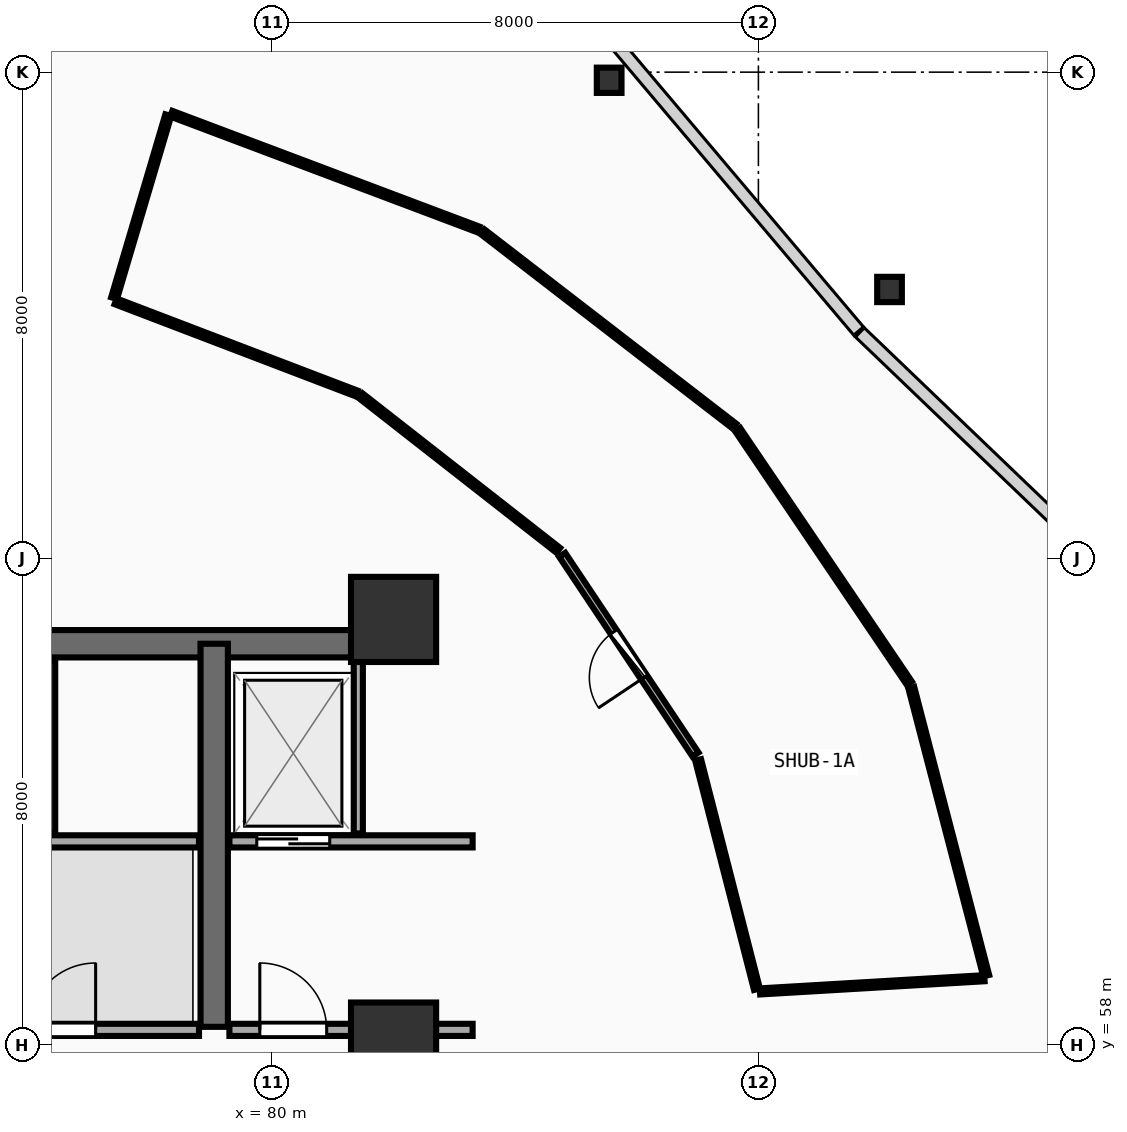
"""IFC4 building model, lengths in metres.
Left out: names, types, materials, properties, quantities, classifications, styles, units other than length and angle.
Written with IfcOpenShell. Run it as: python <this file> out.ifc"""

import sys

from ifc_helpers import new_model, si_unit, direction, frame, frame_2d, origin, origin_2d, place, context, subcontext, project, spatial, rectangle, i_section, extrude, element, fill, save


model = new_model("IFC4")
c1 = context("Model", 3, precision=1e-05, world=origin(), true_north=direction((0.0, 1.0)))
c2 = subcontext(c1, "Body", "Model", "MODEL_VIEW")
j1 = project(units=[si_unit("LENGTHUNIT", "METRE"), si_unit("PLANEANGLEUNIT", "RADIAN")], contexts=[c1])
p1 = place(None, origin())
s1 = spatial("IfcSite", under=j1, at=p1, CompositionType="ELEMENT")
p2 = place(p1, origin())
s2 = spatial("IfcBuilding", under=s1, at=p2, CompositionType="ELEMENT")
p3 = place(p2, frame((0.0, 0.0, 4.5)))
s3 = spatial("IfcBuildingStorey", under=s2, at=p3, CompositionType="ELEMENT", Elevation=4.5)
for number, where, z_axis, x_axis in (
    (1, (82.0, 58.0, 0.0), (0.0, 0.0, 1.0), (1.0, 0.0, 0.0)),
    (2, (82.0, 65.0, 0.0), (0.0, 0.0, 1.0), (1.0, 0.0, 0.0)),
):
    element("IfcColumn", number, at=place(p3, frame(where, z_axis=z_axis, x_axis=x_axis)), inside=s3, PredefinedType="PILASTER", context=c2, shape_type="SweptSolid", body=[
        extrude(rectangle(XDim=1.4, YDim=1.4, at=origin_2d()), origin(), (0.0, 0.0, 1.0), 4.5),
    ])
for number, where, z_axis, x_axis in (
    (3, (90.156, 70.426, 0.0), (0.0, 0.0, 1.0), (1.0, 0.0, 0.0)),
    (4, (85.546, 73.866, 0.0), (0.0, 0.0, 1.0), (1.0, 0.0, 0.0)),
):
    element("IfcColumn", number, at=place(p3, frame(where, z_axis=z_axis, x_axis=x_axis)), inside=s3, PredefinedType="COLUMN", context=c2, shape_type="SweptSolid", body=[
        extrude(i_section(OverallWidth=0.406, OverallDepth=0.416, WebThickness=0.029, FlangeThickness=0.048, FilletRadius=0.015, at=origin_2d()), origin(), (0.0, 0.0, 1.0), 4.5),
    ])
p4 = place(p3, frame((74.0, 64.6, 0.0), z_axis=(0.0, 0.0, 1.0), x_axis=(1.0, 0.0, 0.0)))
e5 = element("IfcWall", 5, at=p4, inside=s3, PredefinedType="SHEAR", context=c2, shape_type="SweptSolid", body=[
    extrude(rectangle(XDim=8.0, YDim=0.45, at=frame_2d((4.0, 0.0))), origin(), (0.0, 0.0, 1.0), 4.2),
])
p5 = place(p3, frame((79.05, 58.3, 0.0), z_axis=(0.0, 0.0, 1.0), x_axis=(0.0, 1.0, 0.0)))
e6 = element("IfcWall", 6, at=p5, inside=s3, PredefinedType="SHEAR", context=c2, shape_type="SweptSolid", body=[
    extrude(rectangle(XDim=6.3, YDim=0.45, at=frame_2d((3.15, 0.0))), origin(), (0.0, 0.0, 1.0), 4.2),
])
p6 = place(p3, frame((74.2, 61.35, 0.0), z_axis=(0.0, 0.0, 1.0), x_axis=(1.0, 0.0, 0.0)))
e7 = element("IfcWall", 7, at=p6, inside=s3, PredefinedType="SOLIDWALL", context=c2, shape_type="SweptSolid", body=[
    extrude(rectangle(XDim=4.6, YDim=0.2, at=frame_2d((2.3, 0.0))), origin(), (0.0, 0.0, 1.0), 4.19),
])
p7 = place(p6, frame((0.52, 0.0, 0.0)))
e8 = element("IfcOpeningElement", 8, at=p7, cuts=e7, PredefinedType="OPENING", context=c2, shape_type="SweptSolid", body=[
    extrude(rectangle(XDim=1.2, YDim=2.15, at=frame_2d((0.6, 1.075))), frame((0.0, 0.11, 0.0), z_axis=(0.0, -1.0, 0.0), x_axis=(1.0, 0.0, 0.0)), (0.0, 0.0, 1.0), 0.22),
])
p8 = place(p3, frame((76.36, 61.48, 0.0), z_axis=(0.0, 0.0, 1.0), x_axis=(0.0, 1.0, 0.0)))
e9 = element("IfcWall", 9, at=p8, inside=s3, PredefinedType="PARTITIONING", context=c2, shape_type="SweptSolid", body=[
    extrude(rectangle(XDim=2.84, YDim=0.15, at=frame_2d((1.42, 0.0))), origin(), (0.0, 0.0, 1.0), 4.19),
])
p9 = place(p3, frame((79.3, 61.35, 0.0), z_axis=(0.0, 0.0, 1.0), x_axis=(1.0, 0.0, 0.0)))
e10 = element("IfcWall", 10, at=p9, inside=s3, PredefinedType="SOLIDWALL", context=c2, shape_type="SweptSolid", body=[
    extrude(rectangle(XDim=4.0, YDim=0.2, at=frame_2d((2.0, 0.0))), origin(), (0.0, 0.0, 1.0), 3.485),
])
p10 = place(p9, frame((0.45, 0.0, 0.0)))
e11 = element("IfcOpeningElement", 11, at=p10, cuts=e10, PredefinedType="OPENING", context=c2, shape_type="SweptSolid", body=[
    extrude(rectangle(XDim=1.2, YDim=2.15, at=frame_2d((0.6, 1.075))), frame((0.0, 0.11, 0.0), z_axis=(0.0, -1.0, 0.0), x_axis=(1.0, 0.0, 0.0)), (0.0, 0.0, 1.0), 0.22),
])
p11 = place(p3, frame((81.42, 61.48, 0.0), z_axis=(0.0, 0.0, 1.0), x_axis=(0.0, 1.0, 0.0)))
e12 = element("IfcWall", 12, at=p11, inside=s3, PredefinedType="PARTITIONING", context=c2, shape_type="SweptSolid", body=[
    extrude(rectangle(XDim=2.84, YDim=0.15, at=frame_2d((1.42, 0.0))), origin(), (0.0, 0.0, 1.0), 4.19),
])
p12 = place(p3, frame((74.2, 58.25, 0.0), z_axis=(0.0, 0.0, 1.0), x_axis=(1.0, 0.0, 0.0)))
e13 = element("IfcWall", 13, at=p12, inside=s3, PredefinedType="SOLIDWALL", context=c2, shape_type="SweptSolid", body=[
    extrude(rectangle(XDim=4.6, YDim=0.2, at=frame_2d((2.3, 0.0))), origin(), (0.0, 0.0, 1.0), 4.19),
])
p13 = place(p12, frame((1.8, 0.0, 0.0)))
e14 = element("IfcOpeningElement", 14, at=p13, cuts=e13, PredefinedType="OPENING", context=c2, shape_type="SweptSolid", body=[
    extrude(rectangle(XDim=1.1, YDim=2.1, at=frame_2d((0.55, 1.05))), frame((0.0, 0.11, 0.0), z_axis=(0.0, -1.0, 0.0), x_axis=(1.0, 0.0, 0.0)), (0.0, 0.0, 1.0), 0.22),
])
p14 = place(p3, frame((79.3, 58.25, 0.0), z_axis=(0.0, 0.0, 1.0), x_axis=(1.0, 0.0, 0.0)))
e15 = element("IfcWall", 15, at=p14, inside=s3, PredefinedType="SOLIDWALL", context=c2, shape_type="SweptSolid", body=[
    extrude(rectangle(XDim=4.0, YDim=0.2, at=frame_2d((2.0, 0.0))), origin(), (0.0, 0.0, 1.0), 3.485),
])
p15 = place(p14, frame((0.5, 0.0, 0.0)))
e16 = element("IfcOpeningElement", 16, at=p15, cuts=e15, PredefinedType="OPENING", context=c2, shape_type="SweptSolid", body=[
    extrude(rectangle(XDim=1.1, YDim=2.1, at=frame_2d((0.55, 1.05))), frame((0.0, 0.11, 0.0), z_axis=(0.0, -1.0, 0.0), x_axis=(1.0, 0.0, 0.0)), (0.0, 0.0, 1.0), 0.22),
])
p16 = place(p3, frame((86.966, 62.778, 0.0), z_axis=(0.0, 0.0, 1.0), x_axis=(-0.555256503379, 0.831679154154, 0.0)))
e17 = element("IfcWall", 17, at=p16, inside=s3, PredefinedType="PARTITIONING", context=c2, shape_type="SweptSolid", body=[
    extrude(rectangle(XDim=3.949, YDim=0.12, at=frame_2d((1.975, 0.0))), origin(), (0.0, 0.0, 1.0), 3.585),
])
p17 = place(p16, frame((1.524, 0.0, 0.0)))
e18 = element("IfcOpeningElement", 18, at=p17, cuts=e17, PredefinedType="OPENING", context=c2, shape_type="SweptSolid", body=[
    extrude(rectangle(XDim=0.9, YDim=2.08, at=frame_2d((0.45, 1.04))), frame((0.0, 0.07, 0.0), z_axis=(0.0, -1.0, 0.0), x_axis=(1.0, 0.0, 0.0)), (0.0, 0.0, 1.0), 0.14),
])
p18 = place(p3, frame((87.976, 58.919, 0.0), z_axis=(0.0, 0.0, 1.0), x_axis=(-0.2484930483, 0.968633679441, 0.0)))
e19 = element("IfcWall", 19, at=p18, inside=s3, PredefinedType="PARTITIONING", context=c2, shape_type="SweptSolid", body=[
    extrude(rectangle(XDim=3.893, YDim=0.1, at=frame_2d((1.946, 0.0))), origin(), (0.0, 0.0, 1.0), 4.19),
])
p19 = place(p3, frame((84.708, 66.137, 0.0), z_axis=(0.0, 0.0, 1.0), x_axis=(-0.787643654738, 0.616131051929, 0.0)))
e20 = element("IfcWall", 20, at=p19, inside=s3, PredefinedType="PARTITIONING", context=c2, shape_type="SweptSolid", body=[
    extrude(rectangle(XDim=4.124, YDim=0.1, at=frame_2d((2.062, 0.0))), origin(), (0.0, 0.0, 1.0), 3.585),
])
p20 = place(p3, frame((81.392, 68.716, 0.0), z_axis=(0.0, 0.0, 1.0), x_axis=(-0.934094181621, 0.357026693487, 0.0)))
e21 = element("IfcWall", 21, at=p20, inside=s3, PredefinedType="PARTITIONING", context=c2, shape_type="SweptSolid", body=[
    extrude(rectangle(XDim=4.242, YDim=0.1, at=frame_2d((2.121, 0.0))), origin(), (0.0, 0.0, 1.0), 3.585),
])
p21 = place(p3, frame((77.403, 70.283, 0.0), z_axis=(0.0, 0.0, 1.0), x_axis=(0.284027408145, 0.958816161432, 0.0)))
e22 = element("IfcWall", 22, at=p21, inside=s3, PredefinedType="PARTITIONING", context=c2, shape_type="SweptSolid", body=[
    extrude(rectangle(XDim=3.138, YDim=0.1, at=frame_2d((1.569, 0.0))), origin(), (0.0, 0.0, 1.0), 3.945),
])
p22 = place(p3, frame((78.344, 73.317, 0.0), z_axis=(0.0, 0.0, 1.0), x_axis=(0.935761144596, -0.35263448536, 0.0)))
e23 = element("IfcWall", 23, at=p22, inside=s3, PredefinedType="PARTITIONING", context=c2, shape_type="SweptSolid", body=[
    extrude(rectangle(XDim=5.399, YDim=0.1, at=frame_2d((2.699, 0.0))), origin(), (0.0, 0.0, 1.0), 3.585),
])
p23 = place(p3, frame((83.465, 71.375, 0.0), z_axis=(0.0, 0.0, 1.0), x_axis=(0.791722248932, -0.610881232766, 0.0)))
e24 = element("IfcWall", 24, at=p23, inside=s3, PredefinedType="PARTITIONING", context=c2, shape_type="SweptSolid", body=[
    extrude(rectangle(XDim=5.229, YDim=0.1, at=frame_2d((2.614, 0.0))), origin(), (0.0, 0.0, 1.0), 3.585),
])
p24 = place(p3, frame((87.658, 68.123, 0.0), z_axis=(0.0, 0.0, 1.0), x_axis=(0.560570503323, -0.828106702548, 0.0)))
e25 = element("IfcWall", 25, at=p24, inside=s3, PredefinedType="PARTITIONING", context=c2, shape_type="SweptSolid", body=[
    extrude(rectangle(XDim=5.036, YDim=0.1, at=frame_2d((2.518, 0.0))), origin(), (0.0, 0.0, 1.0), 3.585),
])
p25 = place(p3, frame((90.514, 63.88, 0.0), z_axis=(0.0, 0.0, 1.0), x_axis=(0.251697355595, -0.967805993568, 0.0)))
e26 = element("IfcWall", 26, at=p25, inside=s3, PredefinedType="PARTITIONING", context=c2, shape_type="SweptSolid", body=[
    extrude(rectangle(XDim=4.897, YDim=0.1, at=frame_2d((2.449, 0.0))), origin(), (0.0, 0.0, 1.0), 4.19),
])
p26 = place(p3, frame((91.717, 59.1, 0.0), z_axis=(0.0, 0.0, 1.0), x_axis=(-0.99827186777, -0.058764598341, 0.0)))
e27 = element("IfcWall", 27, at=p26, inside=s3, PredefinedType="PARTITIONING", context=c2, shape_type="SweptSolid", body=[
    extrude(rectangle(XDim=3.698, YDim=0.1, at=frame_2d((1.849, 0.0))), origin(), (0.0, 0.0, 1.0), 4.19),
])
p27 = place(p10, origin())
e28 = element("IfcDoor", 28, at=p27, inside=s3, OperationType="DOUBLE_DOOR_SLIDING", PredefinedType="DOOR", context=c2, shape_type="SweptSolid", body=[
    extrude(rectangle(XDim=1.2, YDim=2.15, at=frame_2d((0.6, 1.075))), frame((0.0, 0.025, 0.0), z_axis=(0.0, -1.0, 0.0), x_axis=(1.0, 0.0, 0.0)), (0.0, 0.0, 1.0), 0.05),
])
fill(e11, e28)
p28 = place(p13, frame((1.1, 0.0, 0.0), z_axis=(0.0, 0.0, 1.0), x_axis=(-1.0, 0.0, 0.0)))
e29 = element("IfcDoor", 29, at=p28, inside=s3, OperationType="SINGLE_SWING_LEFT", PredefinedType="DOOR", context=c2, shape_type="SweptSolid", body=[
    extrude(rectangle(XDim=1.1, YDim=2.1, at=frame_2d((0.55, 1.05))), frame((0.0, 0.025, 0.0), z_axis=(0.0, -1.0, 0.0), x_axis=(1.0, 0.0, 0.0)), (0.0, 0.0, 1.0), 0.05),
])
fill(e14, e29)
p29 = place(p15, frame((1.1, 0.0, 0.0), z_axis=(0.0, 0.0, 1.0), x_axis=(-1.0, 0.0, 0.0)))
e30 = element("IfcDoor", 30, at=p29, inside=s3, OperationType="SINGLE_SWING_RIGHT", PredefinedType="DOOR", context=c2, shape_type="SweptSolid", body=[
    extrude(rectangle(XDim=1.1, YDim=2.1, at=frame_2d((0.55, 1.05))), frame((0.0, 0.025, 0.0), z_axis=(0.0, -1.0, 0.0), x_axis=(1.0, 0.0, 0.0)), (0.0, 0.0, 1.0), 0.05),
])
fill(e16, e30)
p30 = place(p17, origin())
e31 = element("IfcDoor", 31, at=p30, inside=s3, OperationType="SINGLE_SWING_LEFT", PredefinedType="DOOR", context=c2, shape_type="SweptSolid", body=[
    extrude(rectangle(XDim=0.9, YDim=2.08, at=frame_2d((0.45, 1.04))), frame((0.0, 0.025, 0.0), z_axis=(0.0, -1.0, 0.0), x_axis=(1.0, 0.0, 0.0)), (0.0, 0.0, 1.0), 0.05),
])
fill(e18, e31)
save(model, sys.argv[1])
